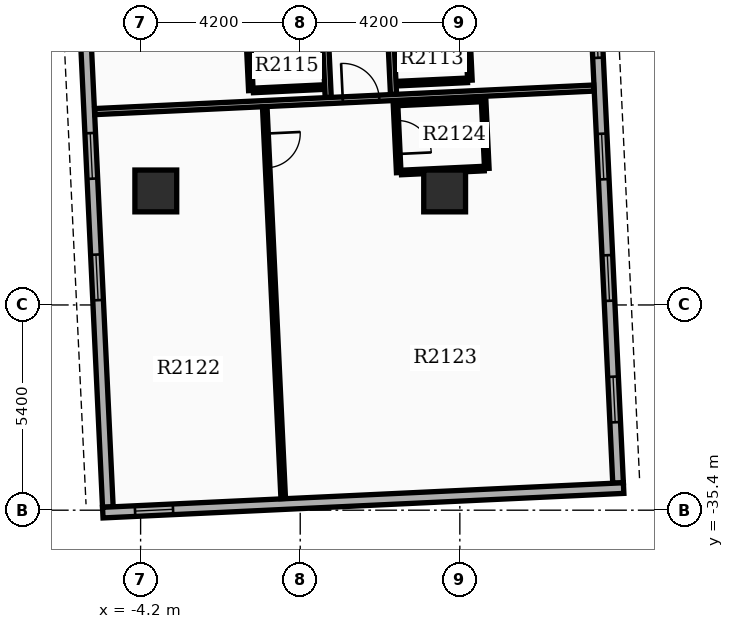
"""IFC4 building model, lengths in metres.
Left out: names, types, materials, properties, quantities, classifications, styles, units other than length and angle.
Written with IfcOpenShell. Run it as: python <this file> out.ifc"""

import sys

from ifc_helpers import new_model, si_unit, direction, frame, frame_2d, origin, origin_2d, place, context, subcontext, project, spatial, rectangle, extrude, element, fill, save


model = new_model("IFC4")
c1 = context("Model", 3, precision=1e-05, world=origin(), true_north=direction((0.0, 1.0)))
c2 = subcontext(c1, "Body", "Model", "MODEL_VIEW")
j1 = project(units=[si_unit("LENGTHUNIT", "METRE"), si_unit("PLANEANGLEUNIT", "RADIAN")], contexts=[c1])
p1 = place(None, origin())
s1 = spatial("IfcSite", under=j1, at=p1, CompositionType="ELEMENT")
p2 = place(p1, origin())
s2 = spatial("IfcBuilding", under=s1, at=p2, CompositionType="ELEMENT")
p3 = place(p2, frame((0.0, 0.0, 132.0)))
s3 = spatial("IfcBuildingStorey", under=s2, at=p3, CompositionType="ELEMENT", Elevation=132.0)
for number, where, z_axis, x_axis in (
    (1, (-3.8, -27.0, 0.0), (0.0, 0.0, 1.0), (1.0, 0.0, 0.0)),
    (2, (3.8, -27.0, 0.0), (0.0, 0.0, 1.0), (1.0, 0.0, 0.0)),
):
    element("IfcColumn", number, at=place(p3, frame(where, z_axis=z_axis, x_axis=x_axis)), inside=s3, PredefinedType="COLUMN", context=c2, shape_type="SweptSolid", body=[
        extrude(rectangle(XDim=1.1, YDim=1.1, at=origin_2d()), origin(), (0.0, 0.0, 1.0), 3.9),
    ])
p4 = place(p3, frame((-6.009, -15.24, 0.0), z_axis=(0.0, 0.0, 1.0), x_axis=(0.047103473814, -0.998890015344, 0.0)))
e3 = element("IfcWall", 3, at=p4, inside=s3, PredefinedType="STANDARD", context=c2, shape_type="SweptSolid", body=[
    extrude(rectangle(XDim=20.1, YDim=0.28, at=frame_2d((10.05, 0.0))), origin(), (0.0, 0.0, 1.0), 2.97),
])
p5 = place(p4, frame((1.6, 0.0, 0.8)))
e4 = element("IfcOpeningElement", 4, at=p5, cuts=e3, PredefinedType="OPENING", context=c2, shape_type="SweptSolid", body=[
    extrude(rectangle(XDim=1.2, YDim=1.6, at=frame_2d((0.6, 0.8))), frame((0.0, 0.15, 0.0), z_axis=(0.0, -1.0, 0.0), x_axis=(1.0, 0.0, 0.0)), (0.0, 0.0, 1.0), 0.3),
])
p6 = place(p4, frame((4.8, 0.0, 0.8)))
e5 = element("IfcOpeningElement", 5, at=p6, cuts=e3, PredefinedType="OPENING", context=c2, shape_type="SweptSolid", body=[
    extrude(rectangle(XDim=1.2, YDim=1.6, at=frame_2d((0.6, 0.8))), frame((0.0, 0.15, 0.0), z_axis=(0.0, -1.0, 0.0), x_axis=(1.0, 0.0, 0.0)), (0.0, 0.0, 1.0), 0.3),
])
p7 = place(p4, frame((10.25, 0.0, 0.8)))
e6 = element("IfcOpeningElement", 6, at=p7, cuts=e3, PredefinedType="OPENING", context=c2, shape_type="SweptSolid", body=[
    extrude(rectangle(XDim=1.2, YDim=1.6, at=frame_2d((0.6, 0.8))), frame((0.0, 0.15, 0.0), z_axis=(0.0, -1.0, 0.0), x_axis=(1.0, 0.0, 0.0)), (0.0, 0.0, 1.0), 0.3),
])
p8 = place(p4, frame((13.45, 0.0, 0.8)))
e7 = element("IfcOpeningElement", 7, at=p8, cuts=e3, PredefinedType="OPENING", context=c2, shape_type="SweptSolid", body=[
    extrude(rectangle(XDim=1.2, YDim=1.6, at=frame_2d((0.6, 0.8))), frame((0.0, 0.15, 0.0), z_axis=(0.0, -1.0, 0.0), x_axis=(1.0, 0.0, 0.0)), (0.0, 0.0, 1.0), 0.3),
])
p9 = place(p3, frame((8.363, -34.685, 0.0), z_axis=(0.0, 0.0, 1.0), x_axis=(-0.047103473814, 0.998890015344, 0.0)))
e8 = element("IfcWall", 8, at=p9, inside=s3, PredefinedType="STANDARD", context=c2, shape_type="SweptSolid", body=[
    extrude(rectangle(XDim=20.1, YDim=0.28, at=frame_2d((10.05, 0.0))), origin(), (0.0, 0.0, 1.0), 2.97),
])
p10 = place(p9, frame((1.6, 0.0, 0.8)))
e9 = element("IfcOpeningElement", 9, at=p10, cuts=e8, PredefinedType="OPENING", context=c2, shape_type="SweptSolid", body=[
    extrude(rectangle(XDim=1.2, YDim=1.6, at=frame_2d((0.6, 0.8))), frame((0.0, 0.15, 0.0), z_axis=(0.0, -1.0, 0.0), x_axis=(1.0, 0.0, 0.0)), (0.0, 0.0, 1.0), 0.3),
])
p11 = place(p9, frame((4.8, 0.0, 0.8)))
e10 = element("IfcOpeningElement", 10, at=p11, cuts=e8, PredefinedType="OPENING", context=c2, shape_type="SweptSolid", body=[
    extrude(rectangle(XDim=1.2, YDim=1.6, at=frame_2d((0.6, 0.8))), frame((0.0, 0.15, 0.0), z_axis=(0.0, -1.0, 0.0), x_axis=(1.0, 0.0, 0.0)), (0.0, 0.0, 1.0), 0.3),
])
p12 = place(p9, frame((8.0, 0.0, 0.8)))
e11 = element("IfcOpeningElement", 11, at=p12, cuts=e8, PredefinedType="OPENING", context=c2, shape_type="SweptSolid", body=[
    extrude(rectangle(XDim=1.2, YDim=1.6, at=frame_2d((0.6, 0.8))), frame((0.0, 0.15, 0.0), z_axis=(0.0, -1.0, 0.0), x_axis=(1.0, 0.0, 0.0)), (0.0, 0.0, 1.0), 0.3),
])
p13 = place(p9, frame((11.2, 0.0, 0.8)))
e12 = element("IfcOpeningElement", 12, at=p13, cuts=e8, PredefinedType="OPENING", context=c2, shape_type="SweptSolid", body=[
    extrude(rectangle(XDim=1.2, YDim=1.6, at=frame_2d((0.6, 0.8))), frame((0.0, 0.15, 0.0), z_axis=(0.0, -1.0, 0.0), x_axis=(1.0, 0.0, 0.0)), (0.0, 0.0, 1.0), 0.3),
])
p14 = place(p3, frame((-5.195, -35.464, 0.0), z_axis=(0.0, 0.0, 1.0), x_axis=(0.998890092147, 0.047101845086, 0.0)))
e13 = element("IfcWall", 13, at=p14, inside=s3, PredefinedType="STANDARD", context=c2, shape_type="SweptSolid", body=[
    extrude(rectangle(XDim=13.72, YDim=0.28, at=frame_2d((6.86, 0.0))), origin(), (0.0, 0.0, 1.0), 2.97),
])
p15 = place(p14, frame((0.85, 0.0, 0.85)))
e14 = element("IfcOpeningElement", 14, at=p15, cuts=e13, PredefinedType="OPENING", context=c2, shape_type="SweptSolid", body=[
    extrude(rectangle(XDim=1.0, YDim=1.5, at=frame_2d((0.5, 0.75))), frame((0.0, 0.15, 0.0), z_axis=(0.0, -1.0, 0.0), x_axis=(1.0, 0.0, 0.0)), (0.0, 0.0, 1.0), 0.3),
])
p16 = place(p3, frame((1.998, -14.772, 0.0), z_axis=(0.0, 0.0, 1.0), x_axis=(0.047116711769, -0.99888939101, 0.0)))
e15 = element("IfcWall", 15, at=p16, inside=s3, PredefinedType="PARTITIONING", context=c2, shape_type="SweptSolid", body=[
    extrude(rectangle(XDim=9.7, YDim=0.16, at=frame_2d((4.85, 0.0))), origin(), (0.0, 0.0, 1.0), 2.96),
])
p17 = place(p16, frame((1.033, 0.0, 0.0)))
e16 = element("IfcOpeningElement", 16, at=p17, cuts=e15, PredefinedType="OPENING", context=c2, shape_type="SweptSolid", body=[
    extrude(rectangle(XDim=0.96, YDim=2.15, at=frame_2d((0.48, 1.075))), frame((0.0, 0.09, 0.0), z_axis=(0.0, -1.0, 0.0), x_axis=(1.0, 0.0, 0.0)), (0.0, 0.0, 1.0), 0.18),
])
p18 = place(p3, frame((2.582, -24.175, 0.0), z_axis=(0.0, 0.0, 1.0), x_axis=(0.998890786574, 0.047087116047, 0.0)))
e17 = element("IfcWall", 17, at=p18, inside=s3, PredefinedType="PARTITIONING", context=c2, shape_type="SweptSolid", body=[
    extrude(rectangle(XDim=1.82, YDim=0.12, at=frame_2d((0.91, 0.0))), origin(), (0.0, 0.0, 1.0), 2.96),
])
p19 = place(p3, frame((4.376, -22.208, 0.0), z_axis=(0.0, 0.0, 1.0), x_axis=(0.047139425368, -0.998888319371, 0.0)))
e18 = element("IfcWall", 18, at=p19, inside=s3, PredefinedType="PARTITIONING", context=c2, shape_type="SweptSolid", body=[
    extrude(rectangle(XDim=1.88, YDim=0.12, at=frame_2d((0.94, 0.0))), origin(), (0.0, 0.0, 1.0), 2.96),
])
p20 = place(p3, frame((0.28, -14.853, 0.0), z_axis=(0.0, 0.0, 1.0), x_axis=(0.047091598416, -0.998890575268, 0.0)))
e19 = element("IfcWall", 19, at=p20, inside=s3, PredefinedType="PARTITIONING", context=c2, shape_type="SweptSolid", body=[
    extrude(rectangle(XDim=9.7, YDim=0.16, at=frame_2d((4.85, 0.0))), origin(), (0.0, 0.0, 1.0), 2.96),
])
p21 = place(p20, frame((1.033, 0.0, 0.0)))
e20 = element("IfcOpeningElement", 20, at=p21, cuts=e19, PredefinedType="OPENING", context=c2, shape_type="SweptSolid", body=[
    extrude(rectangle(XDim=0.96, YDim=2.15, at=frame_2d((0.48, 1.075))), frame((0.0, 0.09, 0.0), z_axis=(0.0, -1.0, 0.0), x_axis=(1.0, 0.0, 0.0)), (0.0, 0.0, 1.0), 0.18),
])
p22 = place(p3, frame((-1.234, -24.355, 0.0), z_axis=(0.0, 0.0, 1.0), x_axis=(0.998884766924, 0.047214641863, 0.0)))
e21 = element("IfcWall", 21, at=p22, inside=s3, PredefinedType="PARTITIONING", context=c2, shape_type="SweptSolid", body=[
    extrude(rectangle(XDim=1.82, YDim=0.12, at=frame_2d((0.91, 0.0))), origin(), (0.0, 0.0, 1.0), 2.96),
])
p23 = place(p3, frame((-1.388, -22.48, 0.0), z_axis=(0.0, 0.0, 1.0), x_axis=(0.047139425368, -0.998888319371, 0.0)))
e22 = element("IfcWall", 22, at=p23, inside=s3, PredefinedType="PARTITIONING", context=c2, shape_type="SweptSolid", body=[
    extrude(rectangle(XDim=1.88, YDim=0.12, at=frame_2d((0.94, 0.0))), origin(), (0.0, 0.0, 1.0), 2.96),
])
p24 = place(p3, frame((-5.405, -24.912, 0.0), z_axis=(0.0, 0.0, 1.0), x_axis=(0.998889967692, 0.047104484326, 0.0)))
e23 = element("IfcWall", 23, at=p24, inside=s3, PredefinedType="PARTITIONING", context=c2, shape_type="SweptSolid", body=[
    extrude(rectangle(XDim=13.144, YDim=0.16, at=frame_2d((6.572, 0.0))), origin(), (0.0, 0.0, 1.0), 2.96),
])
p25 = place(p24, frame((6.532, 0.0, 0.0)))
e24 = element("IfcOpeningElement", 24, at=p25, cuts=e23, PredefinedType="OPENING", context=c2, shape_type="SweptSolid", body=[
    extrude(rectangle(XDim=0.96, YDim=2.15, at=frame_2d((0.48, 1.075))), frame((0.0, 0.09, 0.0), z_axis=(0.0, -1.0, 0.0), x_axis=(1.0, 0.0, 0.0)), (0.0, 0.0, 1.0), 0.18),
])
p26 = place(p3, frame((-0.933, -24.792, 0.0), z_axis=(0.0, 0.0, 1.0), x_axis=(0.047090456762, -0.998890629089, 0.0)))
e25 = element("IfcWall", 25, at=p26, inside=s3, PredefinedType="PARTITIONING", context=c2, shape_type="SweptSolid", body=[
    extrude(rectangle(XDim=10.312, YDim=0.12, at=frame_2d((5.156, 0.0))), origin(), (0.0, 0.0, 1.0), 2.96),
])
p27 = place(p26, frame((0.7, 0.0, 0.0)))
e26 = element("IfcOpeningElement", 26, at=p27, cuts=e25, PredefinedType="OPENING", context=c2, shape_type="SweptSolid", body=[
    extrude(rectangle(XDim=0.9, YDim=2.1, at=frame_2d((0.45, 1.05))), frame((0.0, 0.07, 0.0), z_axis=(0.0, -1.0, 0.0), x_axis=(1.0, 0.0, 0.0)), (0.0, 0.0, 1.0), 0.14),
])
p28 = place(p3, frame((2.506, -24.699, 0.0), z_axis=(0.0, 0.0, 1.0), x_axis=(0.047087116047, -0.998890786574, 0.0)))
e27 = element("IfcWall", 27, at=p28, inside=s3, PredefinedType="PARTITIONING", context=c2, shape_type="SweptSolid", body=[
    extrude(rectangle(XDim=1.82, YDim=0.12, at=frame_2d((0.91, 0.0))), origin(), (0.0, 0.0, 1.0), 2.96),
])
p29 = place(p28, frame((0.45, 0.0, 0.0)))
e28 = element("IfcOpeningElement", 28, at=p29, cuts=e27, PredefinedType="OPENING", context=c2, shape_type="SweptSolid", body=[
    extrude(rectangle(XDim=0.88, YDim=2.1, at=frame_2d((0.44, 1.05))), frame((0.0, 0.07, 0.0), z_axis=(0.0, -1.0, 0.0), x_axis=(1.0, 0.0, 0.0)), (0.0, 0.0, 1.0), 0.14),
])
p30 = place(p3, frame((4.824, -24.59, 0.0), z_axis=(0.0, 0.0, 1.0), x_axis=(0.047087116047, -0.998890786574, 0.0)))
e29 = element("IfcWall", 29, at=p30, inside=s3, PredefinedType="PARTITIONING", context=c2, shape_type="SweptSolid", body=[
    extrude(rectangle(XDim=1.82, YDim=0.12, at=frame_2d((0.91, 0.0))), origin(), (0.0, 0.0, 1.0), 2.96),
])
for number, where, z_axis, x_axis in (
    (30, (2.576, -24.696, 0.0), (0.0, 0.0, 1.0), (0.999, 0.047, 0.0)),
    (31, (2.662, -26.514, 0.0), (0.0, 0.0, 1.0), (0.999, 0.047, 0.0)),
):
    element("IfcWall", number, at=place(p3, frame(where, z_axis=z_axis, x_axis=x_axis)), inside=s3, PredefinedType="PARTITIONING", context=c2, shape_type="SweptSolid", body=[
        extrude(rectangle(XDim=2.18, YDim=0.12, at=frame_2d((1.09, 0.0))), origin(), (0.0, 0.0, 1.0), 2.96),
    ])
p31 = place(p7, origin())
e32 = element("IfcWindow", 32, at=p31, inside=s3, PartitioningType="SINGLE_PANEL", PredefinedType="WINDOW", context=c2, shape_type="SweptSolid", body=[
    extrude(rectangle(XDim=1.2, YDim=1.6, at=frame_2d((0.6, 0.8))), frame((0.0, 0.03, 0.0), z_axis=(0.0, -1.0, 0.0), x_axis=(1.0, 0.0, 0.0)), (0.0, 0.0, 1.0), 0.06),
])
fill(e6, e32)
p32 = place(p8, origin())
e33 = element("IfcWindow", 33, at=p32, inside=s3, PartitioningType="SINGLE_PANEL", PredefinedType="WINDOW", context=c2, shape_type="SweptSolid", body=[
    extrude(rectangle(XDim=1.2, YDim=1.6, at=frame_2d((0.6, 0.8))), frame((0.0, 0.03, 0.0), z_axis=(0.0, -1.0, 0.0), x_axis=(1.0, 0.0, 0.0)), (0.0, 0.0, 1.0), 0.06),
])
fill(e7, e33)
p33 = place(p10, origin())
e34 = element("IfcWindow", 34, at=p33, inside=s3, PartitioningType="SINGLE_PANEL", PredefinedType="WINDOW", context=c2, shape_type="SweptSolid", body=[
    extrude(rectangle(XDim=1.2, YDim=1.6, at=frame_2d((0.6, 0.8))), frame((0.0, 0.03, 0.0), z_axis=(0.0, -1.0, 0.0), x_axis=(1.0, 0.0, 0.0)), (0.0, 0.0, 1.0), 0.06),
])
fill(e9, e34)
p34 = place(p11, origin())
e35 = element("IfcWindow", 35, at=p34, inside=s3, PartitioningType="SINGLE_PANEL", PredefinedType="WINDOW", context=c2, shape_type="SweptSolid", body=[
    extrude(rectangle(XDim=1.2, YDim=1.6, at=frame_2d((0.6, 0.8))), frame((0.0, 0.03, 0.0), z_axis=(0.0, -1.0, 0.0), x_axis=(1.0, 0.0, 0.0)), (0.0, 0.0, 1.0), 0.06),
])
fill(e10, e35)
p35 = place(p12, origin())
e36 = element("IfcWindow", 36, at=p35, inside=s3, PartitioningType="SINGLE_PANEL", PredefinedType="WINDOW", context=c2, shape_type="SweptSolid", body=[
    extrude(rectangle(XDim=1.2, YDim=1.6, at=frame_2d((0.6, 0.8))), frame((0.0, 0.03, 0.0), z_axis=(0.0, -1.0, 0.0), x_axis=(1.0, 0.0, 0.0)), (0.0, 0.0, 1.0), 0.06),
])
fill(e11, e36)
p36 = place(p13, origin())
e37 = element("IfcWindow", 37, at=p36, inside=s3, PartitioningType="SINGLE_PANEL", PredefinedType="WINDOW", context=c2, shape_type="SweptSolid", body=[
    extrude(rectangle(XDim=1.2, YDim=1.6, at=frame_2d((0.6, 0.8))), frame((0.0, 0.03, 0.0), z_axis=(0.0, -1.0, 0.0), x_axis=(1.0, 0.0, 0.0)), (0.0, 0.0, 1.0), 0.06),
])
fill(e12, e37)
p37 = place(p15, origin())
e38 = element("IfcWindow", 38, at=p37, inside=s3, PartitioningType="SINGLE_PANEL", PredefinedType="WINDOW", context=c2, shape_type="SweptSolid", body=[
    extrude(rectangle(XDim=1.0, YDim=1.5, at=frame_2d((0.5, 0.75))), frame((0.0, 0.03, 0.0), z_axis=(0.0, -1.0, 0.0), x_axis=(1.0, 0.0, 0.0)), (0.0, 0.0, 1.0), 0.06),
])
fill(e14, e38)
p38 = place(p25, origin())
e39 = element("IfcDoor", 39, at=p38, inside=s3, OperationType="SINGLE_SWING_LEFT", PredefinedType="DOOR", context=c2, shape_type="SweptSolid", body=[
    extrude(rectangle(XDim=0.96, YDim=2.15, at=frame_2d((0.48, 1.075))), frame((0.0, 0.025, 0.0), z_axis=(0.0, -1.0, 0.0), x_axis=(1.0, 0.0, 0.0)), (0.0, 0.0, 1.0), 0.05),
])
fill(e24, e39)
p39 = place(p27, origin())
e40 = element("IfcDoor", 40, at=p39, inside=s3, OperationType="SINGLE_SWING_LEFT", PredefinedType="DOOR", context=c2, shape_type="SweptSolid", body=[
    extrude(rectangle(XDim=0.9, YDim=2.1, at=frame_2d((0.45, 1.05))), frame((0.0, 0.025, 0.0), z_axis=(0.0, -1.0, 0.0), x_axis=(1.0, 0.0, 0.0)), (0.0, 0.0, 1.0), 0.05),
])
fill(e26, e40)
p40 = place(p29, origin())
e41 = element("IfcDoor", 41, at=p40, inside=s3, OperationType="SINGLE_SWING_RIGHT", PredefinedType="DOOR", context=c2, shape_type="SweptSolid", body=[
    extrude(rectangle(XDim=0.88, YDim=2.1, at=frame_2d((0.44, 1.05))), frame((0.0, 0.025, 0.0), z_axis=(0.0, -1.0, 0.0), x_axis=(1.0, 0.0, 0.0)), (0.0, 0.0, 1.0), 0.05),
])
fill(e28, e41)
save(model, sys.argv[1])
